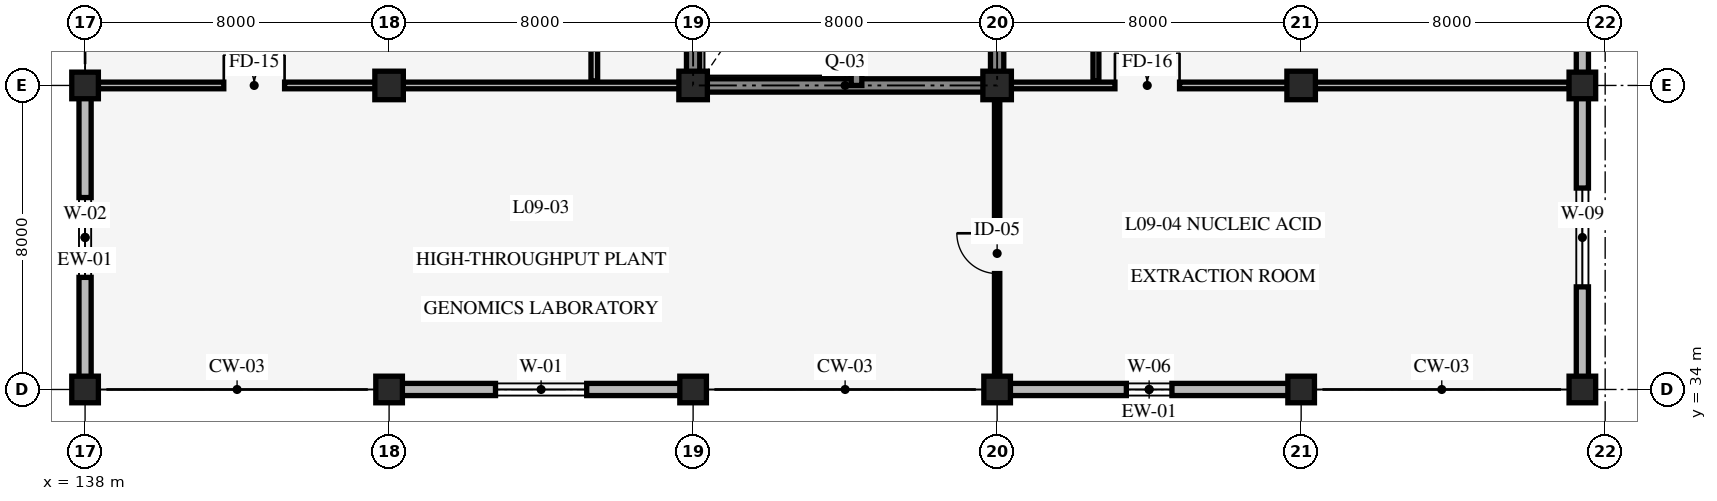
"""IFC4 building model, lengths in metres.
Left out: names, types, materials, properties, quantities, classifications, styles, units other than length and angle.
Written with IfcOpenShell. Run it as: python <this file> out.ifc"""

import sys

from ifc_helpers import new_model, si_unit, direction, frame, frame_2d, origin, origin_2d, place, context, subcontext, project, spatial, rectangle, extrude, element, fill, save


model = new_model("IFC4")
c1 = context("Model", 3, precision=1e-05, world=origin(), true_north=direction((0.0, 1.0)))
c2 = subcontext(c1, "Body", "Model", "MODEL_VIEW")
j1 = project(units=[si_unit("LENGTHUNIT", "METRE"), si_unit("PLANEANGLEUNIT", "RADIAN")], contexts=[c1])
p1 = place(None, origin())
s1 = spatial("IfcSite", under=j1, at=p1, CompositionType="ELEMENT")
p2 = place(p1, origin())
s2 = spatial("IfcBuilding", under=s1, at=p2, CompositionType="ELEMENT")
p3 = place(p2, frame((0.0, 0.0, 36.0)))
s3 = spatial("IfcBuildingStorey", under=s2, at=p3, CompositionType="ELEMENT", Elevation=36.0)
p4 = place(p3, frame((154.0, 42.0, 0.0), z_axis=(0.0, 0.0, 1.0), x_axis=(1.0, 0.0, 0.0)))
e1 = element("IfcWall", 1, at=p4, inside=s3, PredefinedType="SHEAR", context=c2, shape_type="SweptSolid", body=[
    extrude(rectangle(XDim=8.0, YDim=0.35, at=frame_2d((4.0, 0.0))), origin(), (0.0, 0.0, 1.0), 3.95),
])
p5 = place(p3, frame((162.0, 42.0, 0.0), z_axis=(0.0, 0.0, 1.0), x_axis=(0.0, 1.0, 0.0)))
e2 = element("IfcWall", 2, at=p5, inside=s3, PredefinedType="SHEAR", context=c2, shape_type="SweptSolid", body=[
    extrude(rectangle(XDim=8.0, YDim=0.35, at=frame_2d((4.0, 0.0))), origin(), (0.0, 0.0, 1.0), 3.95),
])
p6 = place(p5, frame((3.175, 0.0, 0.0)))
e3 = element("IfcOpeningElement", 3, at=p6, cuts=e2, PredefinedType="OPENING", context=c2, shape_type="SweptSolid", body=[
    extrude(rectangle(XDim=1.05, YDim=2.2, at=frame_2d((0.525, 1.1))), frame((0.0, 0.185, 0.0), z_axis=(0.0, -1.0, 0.0), x_axis=(1.0, 0.0, 0.0)), (0.0, 0.0, 1.0), 0.37),
])
p7 = place(p3, frame((154.0, 50.0, 0.0), z_axis=(0.0, 0.0, 1.0), x_axis=(0.0, -1.0, 0.0)))
e4 = element("IfcWall", 4, at=p7, inside=s3, PredefinedType="SHEAR", context=c2, shape_type="SweptSolid", body=[
    extrude(rectangle(XDim=8.0, YDim=0.35, at=frame_2d((4.0, 0.0))), origin(), (0.0, 0.0, 1.0), 3.95),
])
p8 = place(p3, frame((158.3, 42.0, 0.0), z_axis=(0.0, 0.0, 1.0), x_axis=(0.0, 1.0, 0.0)))
e5 = element("IfcWall", 5, at=p8, inside=s3, PredefinedType="SHEAR", context=c2, shape_type="SweptSolid", body=[
    extrude(rectangle(XDim=8.0, YDim=0.28, at=frame_2d((4.0, 0.0))), origin(), (0.0, 0.0, 1.0), 3.95),
])
for number, where, z_axis, x_axis in (
    (6, (138.0, 34.0, 0.0), (0.0, 0.0, 1.0), (1.0, 0.0, 0.0)),
    (7, (138.0, 42.0, 0.0), (0.0, 0.0, 1.0), (1.0, 0.0, 0.0)),
    (8, (146.0, 34.0, 0.0), (0.0, 0.0, 1.0), (1.0, 0.0, 0.0)),
):
    element("IfcColumn", number, at=place(p3, frame(where, z_axis=z_axis, x_axis=x_axis)), inside=s3, PredefinedType="COLUMN", context=c2, shape_type="SweptSolid", body=[
        extrude(rectangle(XDim=0.7, YDim=0.7, at=origin_2d()), origin(), (0.0, 0.0, 1.0), 4.2),
    ])
p9 = place(p3, frame((146.0, 42.0, 0.0), z_axis=(0.0, 0.0, 1.0), x_axis=(1.0, 0.0, 0.0)))
e9 = element("IfcColumn", 9, at=p9, inside=s3, PredefinedType="COLUMN", context=c2, shape_type="SweptSolid", body=[
    extrude(rectangle(XDim=0.75, YDim=0.75, at=origin_2d()), origin(), (0.0, 0.0, 1.0), 4.2),
])
p10 = place(p3, frame((154.0, 34.0, 0.0), z_axis=(0.0, 0.0, 1.0), x_axis=(1.0, 0.0, 0.0)))
e10 = element("IfcColumn", 10, at=p10, inside=s3, PredefinedType="COLUMN", context=c2, shape_type="SweptSolid", body=[
    extrude(rectangle(XDim=0.7, YDim=0.7, at=origin_2d()), origin(), (0.0, 0.0, 1.0), 4.2),
])
p11 = place(p3, frame((154.0, 42.0, 0.0), z_axis=(0.0, 0.0, 1.0), x_axis=(1.0, 0.0, 0.0)))
e11 = element("IfcColumn", 11, at=p11, inside=s3, PredefinedType="COLUMN", context=c2, shape_type="SweptSolid", body=[
    extrude(rectangle(XDim=0.75, YDim=0.75, at=origin_2d()), origin(), (0.0, 0.0, 1.0), 4.2),
])
p12 = place(p3, frame((162.0, 34.0, 0.0), z_axis=(0.0, 0.0, 1.0), x_axis=(1.0, 0.0, 0.0)))
e12 = element("IfcColumn", 12, at=p12, inside=s3, PredefinedType="COLUMN", context=c2, shape_type="SweptSolid", body=[
    extrude(rectangle(XDim=0.7, YDim=0.7, at=origin_2d()), origin(), (0.0, 0.0, 1.0), 4.2),
])
p13 = place(p3, frame((162.0, 42.0, 0.0), z_axis=(0.0, 0.0, 1.0), x_axis=(1.0, 0.0, 0.0)))
e13 = element("IfcColumn", 13, at=p13, inside=s3, PredefinedType="COLUMN", context=c2, shape_type="SweptSolid", body=[
    extrude(rectangle(XDim=0.75, YDim=0.75, at=origin_2d()), origin(), (0.0, 0.0, 1.0), 4.2),
])
p14 = place(p3, frame((170.0, 34.0, 0.0), z_axis=(0.0, 0.0, 1.0), x_axis=(1.0, 0.0, 0.0)))
e14 = element("IfcColumn", 14, at=p14, inside=s3, PredefinedType="COLUMN", context=c2, shape_type="SweptSolid", body=[
    extrude(rectangle(XDim=0.7, YDim=0.7, at=origin_2d()), origin(), (0.0, 0.0, 1.0), 4.2),
])
p15 = place(p3, frame((170.0, 42.0, 0.0), z_axis=(0.0, 0.0, 1.0), x_axis=(1.0, 0.0, 0.0)))
e15 = element("IfcColumn", 15, at=p15, inside=s3, PredefinedType="COLUMN", context=c2, shape_type="SweptSolid", body=[
    extrude(rectangle(XDim=0.75, YDim=0.75, at=origin_2d()), origin(), (0.0, 0.0, 1.0), 4.2),
])
for number, where, z_axis, x_axis in (
    (16, (177.4, 34.0, 0.0), (0.0, 0.0, 1.0), (1.0, 0.0, 0.0)),
    (17, (177.4, 42.0, 0.0), (0.0, 0.0, 1.0), (1.0, 0.0, 0.0)),
):
    element("IfcColumn", number, at=place(p3, frame(where, z_axis=z_axis, x_axis=x_axis)), inside=s3, PredefinedType="COLUMN", context=c2, shape_type="SweptSolid", body=[
        extrude(rectangle(XDim=0.7, YDim=0.7, at=origin_2d()), origin(), (0.0, 0.0, 1.0), 4.2),
    ])
p16 = place(p3, frame((170.0, 34.0, 0.0), z_axis=(0.0, 0.0, 1.0), x_axis=(-1.0, 0.0, 0.0)))
e18 = element("IfcWall", 18, at=p16, inside=s3, PredefinedType="STANDARD", context=c2, shape_type="SweptSolid", body=[
    extrude(rectangle(XDim=8.0, YDim=0.32, at=frame_2d((4.0, 0.0))), origin(), (0.0, 0.0, 1.0), 3.09),
])
p17 = place(p16, frame((3.4, 0.0, 0.85)))
e19 = element("IfcOpeningElement", 19, at=p17, cuts=e18, PredefinedType="OPENING", context=c2, shape_type="SweptSolid", body=[
    extrude(rectangle(XDim=1.2, YDim=1.2, at=frame_2d((0.6, 0.6))), frame((0.0, 0.17, 0.0), z_axis=(0.0, -1.0, 0.0), x_axis=(1.0, 0.0, 0.0)), (0.0, 0.0, 1.0), 0.34),
])
p18 = place(p3, frame((154.0, 34.0, 0.0), z_axis=(0.0, 0.0, 1.0), x_axis=(-1.0, 0.0, 0.0)))
e20 = element("IfcWall", 20, at=p18, inside=s3, PredefinedType="STANDARD", context=c2, shape_type="SweptSolid", body=[
    extrude(rectangle(XDim=8.0, YDim=0.32, at=frame_2d((4.0, 0.0))), origin(), (0.0, 0.0, 1.0), 3.19),
])
p19 = place(p18, frame((2.8, 0.0, 0.85)))
e21 = element("IfcOpeningElement", 21, at=p19, cuts=e20, PredefinedType="OPENING", context=c2, shape_type="SweptSolid", body=[
    extrude(rectangle(XDim=2.4, YDim=1.8, at=frame_2d((1.2, 0.9))), frame((0.0, 0.17, 0.0), z_axis=(0.0, -1.0, 0.0), x_axis=(1.0, 0.0, 0.0)), (0.0, 0.0, 1.0), 0.34),
])
p20 = place(p3, frame((138.0, 34.0, 0.0), z_axis=(0.0, 0.0, 1.0), x_axis=(0.0, 1.0, 0.0)))
e22 = element("IfcWall", 22, at=p20, inside=s3, PredefinedType="STANDARD", context=c2, shape_type="SweptSolid", body=[
    extrude(rectangle(XDim=8.0, YDim=0.32, at=frame_2d((4.0, 0.0))), origin(), (0.0, 0.0, 1.0), 3.4),
])
p21 = place(p20, frame((2.95, 0.0, 0.85)))
e23 = element("IfcOpeningElement", 23, at=p21, cuts=e22, PredefinedType="OPENING", context=c2, shape_type="SweptSolid", body=[
    extrude(rectangle(XDim=2.1, YDim=1.6, at=frame_2d((1.05, 0.8))), frame((0.0, 0.17, 0.0), z_axis=(0.0, -1.0, 0.0), x_axis=(1.0, 0.0, 0.0)), (0.0, 0.0, 1.0), 0.34),
])
p22 = place(p3, frame((177.4, 50.0, 0.0), z_axis=(0.0, 0.0, 1.0), x_axis=(0.0, -1.0, 0.0)))
e24 = element("IfcWall", 24, at=p22, inside=s3, PredefinedType="STANDARD", context=c2, shape_type="SweptSolid", body=[
    extrude(rectangle(XDim=8.0, YDim=0.32, at=frame_2d((4.0, 0.0))), origin(), (0.0, 0.0, 1.0), 3.14),
])
p23 = place(p3, frame((177.4, 42.0, 0.0), z_axis=(0.0, 0.0, 1.0), x_axis=(0.0, -1.0, 0.0)))
e25 = element("IfcWall", 25, at=p23, inside=s3, PredefinedType="STANDARD", context=c2, shape_type="SweptSolid", body=[
    extrude(rectangle(XDim=8.0, YDim=0.32, at=frame_2d((4.0, 0.0))), origin(), (0.0, 0.0, 1.0), 3.14),
])
p24 = place(p23, frame((2.7, 0.0, 0.85)))
e26 = element("IfcOpeningElement", 26, at=p24, cuts=e25, PredefinedType="OPENING", context=c2, shape_type="SweptSolid", body=[
    extrude(rectangle(XDim=2.6, YDim=1.5, at=frame_2d((1.3, 0.75))), frame((0.0, 0.17, 0.0), z_axis=(0.0, -1.0, 0.0), x_axis=(1.0, 0.0, 0.0)), (0.0, 0.0, 1.0), 0.34),
])
p25 = place(p3, frame((151.4, 42.12, 0.0), z_axis=(0.0, 0.0, 1.0), x_axis=(0.0, 1.0, 0.0)))
e27 = element("IfcWall", 27, at=p25, inside=s3, PredefinedType="STANDARD", context=c2, shape_type="SweptSolid", body=[
    extrude(rectangle(XDim=15.76, YDim=0.175, at=frame_2d((7.88, 0.0))), origin(), (0.0, 0.0, 1.0), 3.9),
])
p26 = place(p25, frame((7.18, 0.0, 0.0)))
e28 = element("IfcOpeningElement", 28, at=p26, cuts=e27, PredefinedType="OPENING", context=c2, shape_type="SweptSolid", body=[
    extrude(rectangle(XDim=1.4, YDim=2.2, at=frame_2d((0.7, 1.1))), frame((0.0, 0.098, 0.0), z_axis=(0.0, -1.0, 0.0), x_axis=(1.0, 0.0, 0.0)), (0.0, 0.0, 1.0), 0.195),
])
p27 = place(p3, frame((164.6, 42.12, 0.0), z_axis=(0.0, 0.0, 1.0), x_axis=(0.0, 1.0, 0.0)))
e29 = element("IfcWall", 29, at=p27, inside=s3, PredefinedType="STANDARD", context=c2, shape_type="SweptSolid", body=[
    extrude(rectangle(XDim=7.8, YDim=0.155, at=frame_2d((3.9, 0.0))), origin(), (0.0, 0.0, 1.0), 3.9),
])
p28 = place(p27, frame((3.425, 0.0, 0.0)))
e30 = element("IfcOpeningElement", 30, at=p28, cuts=e29, PredefinedType="OPENING", context=c2, shape_type="SweptSolid", body=[
    extrude(rectangle(XDim=0.95, YDim=2.1, at=frame_2d((0.475, 1.05))), frame((0.0, 0.087, 0.0), z_axis=(0.0, -1.0, 0.0), x_axis=(1.0, 0.0, 0.0)), (0.0, 0.0, 1.0), 0.175),
])
p29 = place(p3, frame((138.35, 42.0, 0.0), z_axis=(0.0, 0.0, 1.0), x_axis=(1.0, 0.0, 0.0)))
e31 = element("IfcWall", 31, at=p29, inside=s3, PredefinedType="STANDARD", context=c2, shape_type="SweptSolid", body=[
    extrude(rectangle(XDim=15.3, YDim=0.175, at=frame_2d((7.65, 0.0))), origin(), (0.0, 0.0, 1.0), 3.09),
])
p30 = place(p29, frame((3.3, 0.0, 0.0)))
e32 = element("IfcOpeningElement", 32, at=p30, cuts=e31, PredefinedType="OPENING", context=c2, shape_type="SweptSolid", body=[
    extrude(rectangle(XDim=1.6, YDim=2.25, at=frame_2d((0.8, 1.125))), frame((0.0, 0.098, 0.0), z_axis=(0.0, -1.0, 0.0), x_axis=(1.0, 0.0, 0.0)), (0.0, 0.0, 1.0), 0.195),
])
p31 = place(p3, frame((162.0, 34.05, 0.0), z_axis=(0.0, 0.0, 1.0), x_axis=(0.0, 1.0, 0.0)))
e33 = element("IfcWall", 33, at=p31, inside=s3, PredefinedType="STANDARD", context=c2, shape_type="SweptSolid", body=[
    extrude(rectangle(XDim=7.83, YDim=0.14, at=frame_2d((3.915, 0.0))), origin(), (0.0, 0.0, 1.0), 3.14),
])
p32 = place(p31, frame((3.0, 0.0, 0.0)))
e34 = element("IfcOpeningElement", 34, at=p32, cuts=e33, PredefinedType="OPENING", context=c2, shape_type="SweptSolid", body=[
    extrude(rectangle(XDim=1.06, YDim=2.12, at=frame_2d((0.53, 1.06))), frame((0.0, 0.08, 0.0), z_axis=(0.0, -1.0, 0.0), x_axis=(1.0, 0.0, 0.0)), (0.0, 0.0, 1.0), 0.16),
])
p33 = place(p3, frame((162.35, 42.0, 0.0), z_axis=(0.0, 0.0, 1.0), x_axis=(1.0, 0.0, 0.0)))
e35 = element("IfcWall", 35, at=p33, inside=s3, PredefinedType="STANDARD", context=c2, shape_type="SweptSolid", body=[
    extrude(rectangle(XDim=14.7, YDim=0.175, at=frame_2d((7.35, 0.0))), origin(), (0.0, 0.0, 1.0), 3.09),
])
p34 = place(p33, frame((2.75, 0.0, 0.0)))
e36 = element("IfcOpeningElement", 36, at=p34, cuts=e35, PredefinedType="OPENING", context=c2, shape_type="SweptSolid", body=[
    extrude(rectangle(XDim=1.7, YDim=2.3, at=frame_2d((0.85, 1.15))), frame((0.0, 0.098, 0.0), z_axis=(0.0, -1.0, 0.0), x_axis=(1.0, 0.0, 0.0)), (0.0, 0.0, 1.0), 0.195),
])
p35 = place(p17, origin())
e37 = element("IfcWindow", 37, at=p35, inside=s3, PartitioningType="SINGLE_PANEL", PredefinedType="WINDOW", context=c2, shape_type="SweptSolid", body=[
    extrude(rectangle(XDim=1.2, YDim=1.2, at=frame_2d((0.6, 0.6))), frame((0.0, 0.03, 0.0), z_axis=(0.0, -1.0, 0.0), x_axis=(1.0, 0.0, 0.0)), (0.0, 0.0, 1.0), 0.06),
])
fill(e19, e37)
p36 = place(p19, origin())
e38 = element("IfcWindow", 38, at=p36, inside=s3, PartitioningType="SINGLE_PANEL", PredefinedType="WINDOW", context=c2, shape_type="SweptSolid", body=[
    extrude(rectangle(XDim=2.4, YDim=1.8, at=frame_2d((1.2, 0.9))), frame((0.0, 0.03, 0.0), z_axis=(0.0, -1.0, 0.0), x_axis=(1.0, 0.0, 0.0)), (0.0, 0.0, 1.0), 0.06),
])
fill(e21, e38)
p37 = place(p21, origin())
e39 = element("IfcWindow", 39, at=p37, inside=s3, PartitioningType="SINGLE_PANEL", PredefinedType="WINDOW", context=c2, shape_type="SweptSolid", body=[
    extrude(rectangle(XDim=2.1, YDim=1.6, at=frame_2d((1.05, 0.8))), frame((0.0, 0.03, 0.0), z_axis=(0.0, -1.0, 0.0), x_axis=(1.0, 0.0, 0.0)), (0.0, 0.0, 1.0), 0.06),
])
fill(e23, e39)
p38 = place(p24, origin())
e40 = element("IfcWindow", 40, at=p38, inside=s3, PartitioningType="SINGLE_PANEL", PredefinedType="WINDOW", context=c2, shape_type="SweptSolid", body=[
    extrude(rectangle(XDim=2.6, YDim=1.5, at=frame_2d((1.3, 0.75))), frame((0.0, 0.03, 0.0), z_axis=(0.0, -1.0, 0.0), x_axis=(1.0, 0.0, 0.0)), (0.0, 0.0, 1.0), 0.06),
])
fill(e26, e40)
p39 = place(p30, origin())
e41 = element("IfcDoor", 41, at=p39, inside=s3, OperationType="DOUBLE_DOOR_SINGLE_SWING", PredefinedType="DOOR", context=c2, shape_type="SweptSolid", body=[
    extrude(rectangle(XDim=1.6, YDim=2.25, at=frame_2d((0.8, 1.125))), frame((0.0, 0.025, 0.0), z_axis=(0.0, -1.0, 0.0), x_axis=(1.0, 0.0, 0.0)), (0.0, 0.0, 1.0), 0.05),
])
fill(e32, e41)
p40 = place(p32, origin())
e42 = element("IfcDoor", 42, at=p40, inside=s3, OperationType="SINGLE_SWING_RIGHT", PredefinedType="DOOR", context=c2, shape_type="SweptSolid", body=[
    extrude(rectangle(XDim=1.06, YDim=2.12, at=frame_2d((0.53, 1.06))), frame((0.0, 0.025, 0.0), z_axis=(0.0, -1.0, 0.0), x_axis=(1.0, 0.0, 0.0)), (0.0, 0.0, 1.0), 0.05),
])
fill(e34, e42)
p41 = place(p34, origin())
e43 = element("IfcDoor", 43, at=p41, inside=s3, OperationType="DOUBLE_DOOR_SINGLE_SWING", PredefinedType="DOOR", context=c2, shape_type="SweptSolid", body=[
    extrude(rectangle(XDim=1.7, YDim=2.3, at=frame_2d((0.85, 1.15))), frame((0.0, 0.025, 0.0), z_axis=(0.0, -1.0, 0.0), x_axis=(1.0, 0.0, 0.0)), (0.0, 0.0, 1.0), 0.05),
])
fill(e36, e43)
save(model, sys.argv[1])
